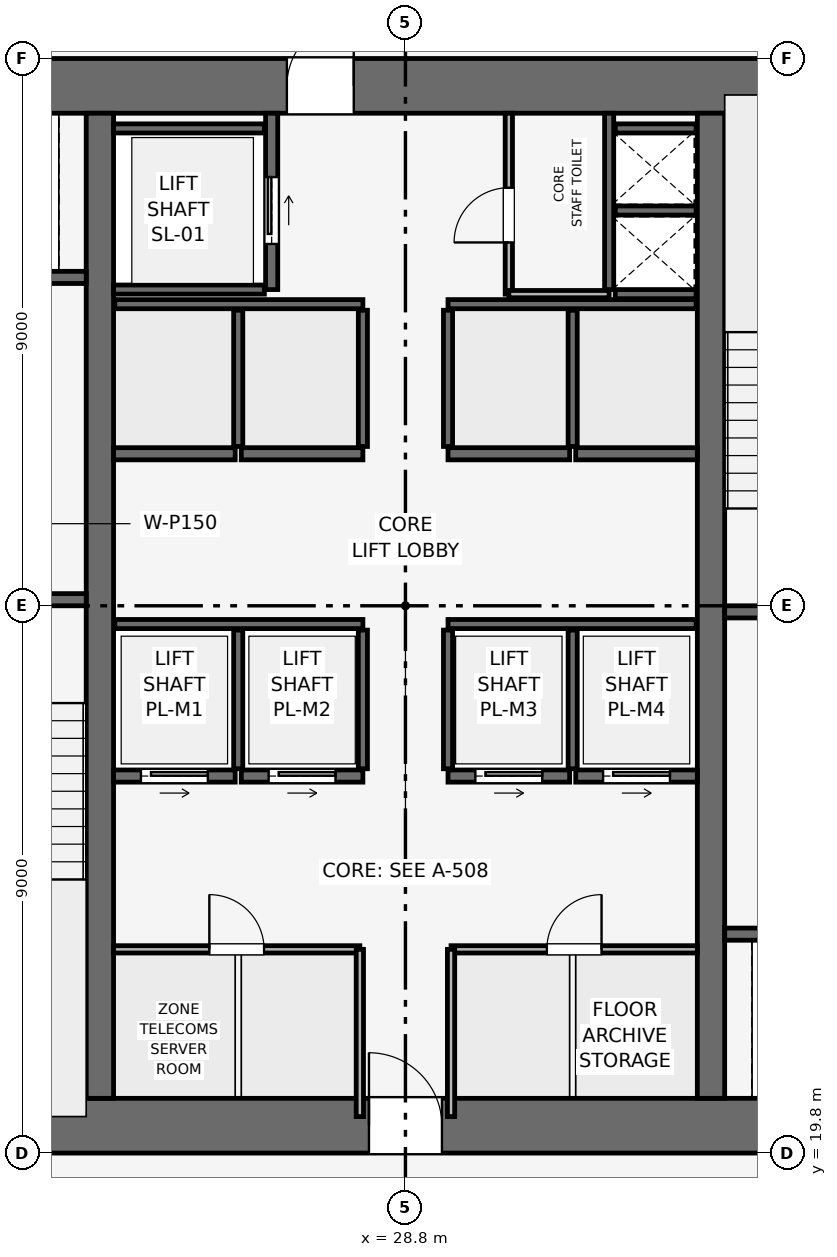
"""IFC4 building model, lengths in metres.
Left out: names, types, materials, properties, quantities, classifications, styles, units other than length and angle.
Written with IfcOpenShell. Run it as: python <this file> out.ifc"""

import sys

from ifc_helpers import new_model, si_unit, direction, frame, frame_2d, origin, place, context, subcontext, project, spatial, rectangle, extrude, element, fill, save


model = new_model("IFC4")
c1 = context("Model", 3, precision=1e-05, world=origin(), true_north=direction((0.0, 1.0)))
c2 = subcontext(c1, "Body", "Model", "MODEL_VIEW")
j1 = project(units=[si_unit("LENGTHUNIT", "METRE"), si_unit("PLANEANGLEUNIT", "RADIAN")], contexts=[c1])
p1 = place(None, origin())
s1 = spatial("IfcSite", under=j1, at=p1, CompositionType="ELEMENT")
p2 = place(p1, origin())
s2 = spatial("IfcBuilding", under=s1, at=p2, CompositionType="ELEMENT")
p3 = place(p2, frame((0.0, 0.0, 183.3)))
s3 = spatial("IfcBuildingStorey", under=s2, at=p3, CompositionType="ELEMENT", Elevation=183.3)
p4 = place(p3, frame((19.8, 20.25, 0.0), z_axis=(0.0, 0.0, 1.0), x_axis=(1.0, 0.0, 0.0)))
e1 = element("IfcWall", 1, at=p4, inside=s3, PredefinedType="SHEAR", context=c2, shape_type="SweptSolid", body=[
    extrude(rectangle(XDim=18.0, YDim=0.9, at=frame_2d((9.0, 0.0))), origin(), (0.0, 0.0, 1.0), 3.75),
])
p5 = place(p4, frame((8.4, 0.0, 0.0)))
e2 = element("IfcOpeningElement", 2, at=p5, cuts=e1, PredefinedType="OPENING", context=c2, shape_type="SweptSolid", body=[
    extrude(rectangle(XDim=1.2, YDim=2.2, at=frame_2d((0.6, 1.1))), frame((0.0, 0.46, 0.0), z_axis=(0.0, -1.0, 0.0), x_axis=(1.0, 0.0, 0.0)), (0.0, 0.0, 1.0), 0.92),
])
p6 = place(p3, frame((19.8, 37.35, 0.0), z_axis=(0.0, 0.0, 1.0), x_axis=(1.0, 0.0, 0.0)))
e3 = element("IfcWall", 3, at=p6, inside=s3, PredefinedType="SHEAR", context=c2, shape_type="SweptSolid", body=[
    extrude(rectangle(XDim=18.0, YDim=0.9, at=frame_2d((9.0, 0.0))), origin(), (0.0, 0.0, 1.0), 3.75),
])
p7 = place(p6, frame((7.05, 0.0, 0.0)))
e4 = element("IfcOpeningElement", 4, at=p7, cuts=e3, PredefinedType="OPENING", context=c2, shape_type="SweptSolid", body=[
    extrude(rectangle(XDim=1.1, YDim=2.15, at=frame_2d((0.55, 1.075))), frame((0.0, 0.46, 0.0), z_axis=(0.0, -1.0, 0.0), x_axis=(1.0, 0.0, 0.0)), (0.0, 0.0, 1.0), 0.92),
])
for number, where, z_axis, x_axis in (
    (5, (23.775, 20.7, 0.0), (0.0, 0.0, 1.0), (0.0, 1.0, 0.0)),
    (6, (33.825, 20.7, 0.0), (0.0, 0.0, 1.0), (0.0, 1.0, 0.0)),
):
    element("IfcWall", number, at=place(p3, frame(where, z_axis=z_axis, x_axis=x_axis)), inside=s3, PredefinedType="SHEAR", context=c2, shape_type="SweptSolid", body=[
        extrude(rectangle(XDim=16.2, YDim=0.45, at=frame_2d((8.1, 0.0))), origin(), (0.0, 0.0, 1.0), 3.75),
    ])
p8 = place(p3, frame((20.4, 28.9, 0.0), z_axis=(0.0, 0.0, 1.0), x_axis=(1.0, 0.0, 0.0)))
e7 = element("IfcWall", 7, at=p8, inside=s3, PredefinedType="SHEAR", context=c2, shape_type="SweptSolid", body=[
    extrude(rectangle(XDim=3.15, YDim=0.2, at=frame_2d((1.575, 0.0))), origin(), (0.0, 0.0, 1.0), 3.495),
])
p9 = place(p8, frame((0.8, 0.0, 0.0)))
e8 = element("IfcOpeningElement", 8, at=p9, cuts=e7, PredefinedType="OPENING", context=c2, shape_type="SweptSolid", body=[
    extrude(rectangle(XDim=1.0, YDim=2.1, at=frame_2d((0.5, 1.05))), frame((0.0, 0.11, 0.0), z_axis=(0.0, -1.0, 0.0), x_axis=(1.0, 0.0, 0.0)), (0.0, 0.0, 1.0), 0.22),
])
p10 = place(p3, frame((34.05, 28.7, 0.0), z_axis=(0.0, 0.0, 1.0), x_axis=(1.0, 0.0, 0.0)))
e9 = element("IfcWall", 9, at=p10, inside=s3, PredefinedType="SHEAR", context=c2, shape_type="SweptSolid", body=[
    extrude(rectangle(XDim=3.15, YDim=0.2, at=frame_2d((1.575, 0.0))), origin(), (0.0, 0.0, 1.0), 3.495),
])
p11 = place(p10, frame((0.8, 0.0, 0.0)))
e10 = element("IfcOpeningElement", 10, at=p11, cuts=e9, PredefinedType="OPENING", context=c2, shape_type="SweptSolid", body=[
    extrude(rectangle(XDim=1.0, YDim=2.1, at=frame_2d((0.5, 1.05))), frame((0.0, 0.11, 0.0), z_axis=(0.0, -1.0, 0.0), x_axis=(1.0, 0.0, 0.0)), (0.0, 0.0, 1.0), 0.22),
])
p12 = place(p3, frame((32.15, 34.0, 0.0), z_axis=(0.0, 0.0, 1.0), x_axis=(0.0, 1.0, 0.0)))
e11 = element("IfcWall", 11, at=p12, inside=s3, PredefinedType="SHEAR", context=c2, shape_type="SweptSolid", body=[
    extrude(rectangle(XDim=2.9, YDim=0.15, at=frame_2d((1.45, 0.0))), origin(), (0.0, 0.0, 1.0), 3.495),
])
for number, where, z_axis, x_axis in (
    (12, (32.25, 33.925, 0.0), (0.0, 0.0, 1.0), (1.0, 0.0, 0.0)),
    (13, (32.25, 35.3, 0.0), (0.0, 0.0, 1.0), (1.0, 0.0, 0.0)),
):
    element("IfcWall", number, at=place(p3, frame(where, z_axis=z_axis, x_axis=x_axis)), inside=s3, PredefinedType="SHEAR", context=c2, shape_type="SweptSolid", body=[
        extrude(rectangle(XDim=1.33, YDim=0.15, at=frame_2d((0.665, 0.0))), origin(), (0.0, 0.0, 1.0), 3.495),
    ])
p13 = place(p3, frame((20.5, 34.2, 0.0), z_axis=(0.0, 0.0, 1.0), x_axis=(1.0, 0.0, 0.0)))
e14 = element("IfcWall", 14, at=p13, inside=s3, PredefinedType="SHEAR", context=c2, shape_type="SweptSolid", body=[
    extrude(rectangle(XDim=3.05, YDim=0.2, at=frame_2d((1.525, 0.0))), origin(), (0.0, 0.0, 1.0), 3.495),
])
p14 = place(p13, frame((0.75, 0.0, 0.0)))
e15 = element("IfcOpeningElement", 15, at=p14, cuts=e14, PredefinedType="OPENING", context=c2, shape_type="SweptSolid", body=[
    extrude(rectangle(XDim=1.1, YDim=2.15, at=frame_2d((0.55, 1.075))), frame((0.0, 0.11, 0.0), z_axis=(0.0, -1.0, 0.0), x_axis=(1.0, 0.0, 0.0)), (0.0, 0.0, 1.0), 0.22),
])
p15 = place(p3, frame((34.05, 23.4, 0.0), z_axis=(0.0, 0.0, 1.0), x_axis=(1.0, 0.0, 0.0)))
e16 = element("IfcWall", 16, at=p15, inside=s3, PredefinedType="SHEAR", context=c2, shape_type="SweptSolid", body=[
    extrude(rectangle(XDim=3.05, YDim=0.2, at=frame_2d((1.525, 0.0))), origin(), (0.0, 0.0, 1.0), 3.495),
])
p16 = place(p15, frame((1.2, 0.0, 0.0)))
e17 = element("IfcOpeningElement", 17, at=p16, cuts=e16, PredefinedType="OPENING", context=c2, shape_type="SweptSolid", body=[
    extrude(rectangle(XDim=1.1, YDim=2.15, at=frame_2d((0.55, 1.075))), frame((0.0, 0.11, 0.0), z_axis=(0.0, -1.0, 0.0), x_axis=(1.0, 0.0, 0.0)), (0.0, 0.0, 1.0), 0.22),
])
p17 = place(p3, frame((26.6, 34.0, 0.0), z_axis=(0.0, 0.0, 1.0), x_axis=(0.0, 1.0, 0.0)))
e18 = element("IfcWall", 18, at=p17, inside=s3, PredefinedType="SHEAR", context=c2, shape_type="SweptSolid", body=[
    extrude(rectangle(XDim=2.9, YDim=0.2, at=frame_2d((1.45, 0.0))), origin(), (0.0, 0.0, 1.0), 3.495),
])
p18 = place(p17, frame((0.75, 0.0, 0.0)))
e19 = element("IfcOpeningElement", 19, at=p18, cuts=e18, PredefinedType="OPENING", context=c2, shape_type="SweptSolid", body=[
    extrude(rectangle(XDim=1.1, YDim=2.15, at=frame_2d((0.55, 1.075))), frame((0.0, 0.11, 0.0), z_axis=(0.0, -1.0, 0.0), x_axis=(1.0, 0.0, 0.0)), (0.0, 0.0, 1.0), 0.22),
])
for number, where, z_axis, x_axis in (
    (20, (24.0, 34.0, 0.0), (0.0, 0.0, 1.0), (1.0, 0.0, 0.0)),
    (21, (24.0, 36.65, 0.0), (0.0, 0.0, 1.0), (1.0, 0.0, 0.0)),
):
    element("IfcWall", number, at=place(p3, frame(where, z_axis=z_axis, x_axis=x_axis)), inside=s3, PredefinedType="SHEAR", context=c2, shape_type="SweptSolid", body=[
        extrude(rectangle(XDim=2.48, YDim=0.15, at=frame_2d((1.24, 0.0))), origin(), (0.0, 0.0, 1.0), 3.495),
    ])
p19 = place(p3, frame((24.0, 26.0, 0.0), z_axis=(0.0, 0.0, 1.0), x_axis=(1.0, 0.0, 0.0)))
e22 = element("IfcWall", 22, at=p19, inside=s3, PredefinedType="SHEAR", context=c2, shape_type="SweptSolid", body=[
    extrude(rectangle(XDim=2.0, YDim=0.2, at=frame_2d((1.0, 0.0))), origin(), (0.0, 0.0, 1.0), 3.495),
])
p20 = place(p19, frame((0.45, 0.0, 0.0)))
e23 = element("IfcOpeningElement", 23, at=p20, cuts=e22, PredefinedType="OPENING", context=c2, shape_type="SweptSolid", body=[
    extrude(rectangle(XDim=1.1, YDim=2.15, at=frame_2d((0.55, 1.075))), frame((0.0, 0.11, 0.0), z_axis=(0.0, -1.0, 0.0), x_axis=(1.0, 0.0, 0.0)), (0.0, 0.0, 1.0), 0.22),
])
p21 = place(p3, frame((26.1, 26.0, 0.0), z_axis=(0.0, 0.0, 1.0), x_axis=(1.0, 0.0, 0.0)))
e24 = element("IfcWall", 24, at=p21, inside=s3, PredefinedType="SHEAR", context=c2, shape_type="SweptSolid", body=[
    extrude(rectangle(XDim=2.0, YDim=0.2, at=frame_2d((1.0, 0.0))), origin(), (0.0, 0.0, 1.0), 3.495),
])
p22 = place(p21, frame((0.45, 0.0, 0.0)))
e25 = element("IfcOpeningElement", 25, at=p22, cuts=e24, PredefinedType="OPENING", context=c2, shape_type="SweptSolid", body=[
    extrude(rectangle(XDim=1.1, YDim=2.15, at=frame_2d((0.55, 1.075))), frame((0.0, 0.11, 0.0), z_axis=(0.0, -1.0, 0.0), x_axis=(1.0, 0.0, 0.0)), (0.0, 0.0, 1.0), 0.22),
])
p23 = place(p3, frame((29.5, 26.0, 0.0), z_axis=(0.0, 0.0, 1.0), x_axis=(1.0, 0.0, 0.0)))
e26 = element("IfcWall", 26, at=p23, inside=s3, PredefinedType="SHEAR", context=c2, shape_type="SweptSolid", body=[
    extrude(rectangle(XDim=2.0, YDim=0.2, at=frame_2d((1.0, 0.0))), origin(), (0.0, 0.0, 1.0), 3.495),
])
p24 = place(p23, frame((0.45, 0.0, 0.0)))
e27 = element("IfcOpeningElement", 27, at=p24, cuts=e26, PredefinedType="OPENING", context=c2, shape_type="SweptSolid", body=[
    extrude(rectangle(XDim=1.1, YDim=2.15, at=frame_2d((0.55, 1.075))), frame((0.0, 0.11, 0.0), z_axis=(0.0, -1.0, 0.0), x_axis=(1.0, 0.0, 0.0)), (0.0, 0.0, 1.0), 0.22),
])
p25 = place(p3, frame((31.6, 26.0, 0.0), z_axis=(0.0, 0.0, 1.0), x_axis=(1.0, 0.0, 0.0)))
e28 = element("IfcWall", 28, at=p25, inside=s3, PredefinedType="SHEAR", context=c2, shape_type="SweptSolid", body=[
    extrude(rectangle(XDim=2.0, YDim=0.2, at=frame_2d((1.0, 0.0))), origin(), (0.0, 0.0, 1.0), 3.495),
])
p26 = place(p25, frame((0.45, 0.0, 0.0)))
e29 = element("IfcOpeningElement", 29, at=p26, cuts=e28, PredefinedType="OPENING", context=c2, shape_type="SweptSolid", body=[
    extrude(rectangle(XDim=1.1, YDim=2.15, at=frame_2d((0.55, 1.075))), frame((0.0, 0.11, 0.0), z_axis=(0.0, -1.0, 0.0), x_axis=(1.0, 0.0, 0.0)), (0.0, 0.0, 1.0), 0.22),
])
for number, where, z_axis, x_axis in (
    (30, (24.0, 31.3, 0.0), (0.0, 0.0, 1.0), (1.0, 0.0, 0.0)),
    (31, (26.1, 31.3, 0.0), (0.0, 0.0, 1.0), (1.0, 0.0, 0.0)),
    (32, (29.5, 31.3, 0.0), (0.0, 0.0, 1.0), (1.0, 0.0, 0.0)),
    (33, (31.6, 31.3, 0.0), (0.0, 0.0, 1.0), (1.0, 0.0, 0.0)),
):
    element("IfcWall", number, at=place(p3, frame(where, z_axis=z_axis, x_axis=x_axis)), inside=s3, PredefinedType="SHEAR", context=c2, shape_type="SweptSolid", body=[
        extrude(rectangle(XDim=2.0, YDim=0.2, at=frame_2d((1.0, 0.0))), origin(), (0.0, 0.0, 1.0), 3.495),
    ])
p27 = place(p3, frame((32.25, 36.65, 0.0), z_axis=(0.0, 0.0, 1.0), x_axis=(1.0, 0.0, 0.0)))
e34 = element("IfcWall", 34, at=p27, inside=s3, PredefinedType="SHEAR", context=c2, shape_type="SweptSolid", body=[
    extrude(rectangle(XDim=1.33, YDim=0.15, at=frame_2d((0.665, 0.0))), origin(), (0.0, 0.0, 1.0), 3.495),
])
for number, where, z_axis, x_axis in (
    (35, (24.02, 28.5, 0.0), (0.0, 0.0, 1.0), (1.0, 0.0, 0.0)),
    (36, (29.5, 28.5, 0.0), (0.0, 0.0, 1.0), (1.0, 0.0, 0.0)),
):
    element("IfcWall", number, at=place(p3, frame(where, z_axis=z_axis, x_axis=x_axis)), inside=s3, PredefinedType="SHEAR", context=c2, shape_type="SweptSolid", body=[
        extrude(rectangle(XDim=4.08, YDim=0.15, at=frame_2d((2.04, 0.0))), origin(), (0.0, 0.0, 1.0), 3.495),
    ])
for number, where, z_axis, x_axis in (
    (37, (26.05, 26.12, 0.0), (0.0, 0.0, 1.0), (0.0, 1.0, 0.0)),
    (38, (28.1, 26.12, 0.0), (0.0, 0.0, 1.0), (0.0, 1.0, 0.0)),
    (39, (29.5, 26.12, 0.0), (0.0, 0.0, 1.0), (0.0, 1.0, 0.0)),
    (40, (31.55, 26.12, 0.0), (0.0, 0.0, 1.0), (0.0, 1.0, 0.0)),
):
    element("IfcWall", number, at=place(p3, frame(where, z_axis=z_axis, x_axis=x_axis)), inside=s3, PredefinedType="SHEAR", context=c2, shape_type="SweptSolid", body=[
        extrude(rectangle(XDim=2.28, YDim=0.15, at=frame_2d((1.14, 0.0))), origin(), (0.0, 0.0, 1.0), 3.495),
    ])
for number, where, z_axis, x_axis in (
    (41, (24.02, 33.76, 0.0), (0.0, 0.0, 1.0), (1.0, 0.0, 0.0)),
    (42, (29.5, 33.76, 0.0), (0.0, 0.0, 1.0), (1.0, 0.0, 0.0)),
):
    element("IfcWall", number, at=place(p3, frame(where, z_axis=z_axis, x_axis=x_axis)), inside=s3, PredefinedType="SHEAR", context=c2, shape_type="SweptSolid", body=[
        extrude(rectangle(XDim=4.08, YDim=0.15, at=frame_2d((2.04, 0.0))), origin(), (0.0, 0.0, 1.0), 3.495),
    ])
for number, where, z_axis, x_axis in (
    (43, (26.05, 31.42, 0.0), (0.0, 0.0, 1.0), (0.0, 1.0, 0.0)),
    (44, (28.1, 31.42, 0.0), (0.0, 0.0, 1.0), (0.0, 1.0, 0.0)),
    (45, (29.5, 31.42, 0.0), (0.0, 0.0, 1.0), (0.0, 1.0, 0.0)),
    (46, (31.55, 31.42, 0.0), (0.0, 0.0, 1.0), (0.0, 1.0, 0.0)),
):
    element("IfcWall", number, at=place(p3, frame(where, z_axis=z_axis, x_axis=x_axis)), inside=s3, PredefinedType="SHEAR", context=c2, shape_type="SweptSolid", body=[
        extrude(rectangle(XDim=2.24, YDim=0.15, at=frame_2d((1.12, 0.0))), origin(), (0.0, 0.0, 1.0), 3.495),
    ])
p28 = place(p3, frame((30.5, 33.925, 0.0), z_axis=(0.0, 0.0, 1.0), x_axis=(0.0, 1.0, 0.0)))
e47 = element("IfcWall", 47, at=p28, inside=s3, PredefinedType="PARTITIONING", context=c2, shape_type="SweptSolid", body=[
    extrude(rectangle(XDim=2.975, YDim=0.12, at=frame_2d((1.487, 0.0))), origin(), (0.0, 0.0, 1.0), 3.495),
])
p29 = place(p28, frame((0.85, 0.0, 0.0)))
e48 = element("IfcOpeningElement", 48, at=p29, cuts=e47, PredefinedType="OPENING", context=c2, shape_type="SweptSolid", body=[
    extrude(rectangle(XDim=0.9, YDim=2.1, at=frame_2d((0.45, 1.05))), frame((0.0, 0.07, 0.0), z_axis=(0.0, -1.0, 0.0), x_axis=(1.0, 0.0, 0.0)), (0.0, 0.0, 1.0), 0.14),
])
p30 = place(p3, frame((30.5, 33.925, 0.0), z_axis=(0.0, 0.0, 1.0), x_axis=(1.0, 0.0, 0.0)))
e49 = element("IfcWall", 49, at=p30, inside=s3, PredefinedType="PARTITIONING", context=c2, shape_type="SweptSolid", body=[
    extrude(rectangle(XDim=1.65, YDim=0.12, at=frame_2d((0.825, 0.0))), origin(), (0.0, 0.0, 1.0), 3.495),
])
p31 = place(p3, frame((24.0, 23.15, 0.0), z_axis=(0.0, 0.0, 1.0), x_axis=(1.0, 0.0, 0.0)))
e50 = element("IfcWall", 50, at=p31, inside=s3, PredefinedType="PARTITIONING", context=c2, shape_type="SweptSolid", body=[
    extrude(rectangle(XDim=4.05, YDim=0.12, at=frame_2d((2.025, 0.0))), origin(), (0.0, 0.0, 1.0), 3.495),
])
p32 = place(p31, frame((1.575, 0.0, 0.0)))
e51 = element("IfcOpeningElement", 51, at=p32, cuts=e50, PredefinedType="OPENING", context=c2, shape_type="SweptSolid", body=[
    extrude(rectangle(XDim=0.9, YDim=2.1, at=frame_2d((0.45, 1.05))), frame((0.0, 0.07, 0.0), z_axis=(0.0, -1.0, 0.0), x_axis=(1.0, 0.0, 0.0)), (0.0, 0.0, 1.0), 0.14),
])
p33 = place(p3, frame((28.05, 20.4, 0.0), z_axis=(0.0, 0.0, 1.0), x_axis=(0.0, 1.0, 0.0)))
e52 = element("IfcWall", 52, at=p33, inside=s3, PredefinedType="PARTITIONING", context=c2, shape_type="SweptSolid", body=[
    extrude(rectangle(XDim=2.75, YDim=0.12, at=frame_2d((1.375, 0.0))), origin(), (0.0, 0.0, 1.0), 3.495),
])
p34 = place(p3, frame((29.55, 23.15, 0.0), z_axis=(0.0, 0.0, 1.0), x_axis=(1.0, 0.0, 0.0)))
e53 = element("IfcWall", 53, at=p34, inside=s3, PredefinedType="PARTITIONING", context=c2, shape_type="SweptSolid", body=[
    extrude(rectangle(XDim=4.05, YDim=0.12, at=frame_2d((2.025, 0.0))), origin(), (0.0, 0.0, 1.0), 3.495),
])
p35 = place(p34, frame((1.575, 0.0, 0.0)))
e54 = element("IfcOpeningElement", 54, at=p35, cuts=e53, PredefinedType="OPENING", context=c2, shape_type="SweptSolid", body=[
    extrude(rectangle(XDim=0.9, YDim=2.1, at=frame_2d((0.45, 1.05))), frame((0.0, 0.07, 0.0), z_axis=(0.0, -1.0, 0.0), x_axis=(1.0, 0.0, 0.0)), (0.0, 0.0, 1.0), 0.14),
])
p36 = place(p3, frame((29.55, 20.4, 0.0), z_axis=(0.0, 0.0, 1.0), x_axis=(0.0, 1.0, 0.0)))
e55 = element("IfcWall", 55, at=p36, inside=s3, PredefinedType="PARTITIONING", context=c2, shape_type="SweptSolid", body=[
    extrude(rectangle(XDim=2.75, YDim=0.12, at=frame_2d((1.375, 0.0))), origin(), (0.0, 0.0, 1.0), 3.495),
])
p37 = place(p18, origin())
e56 = element("IfcDoor", 56, at=p37, inside=s3, OperationType="SLIDING_TO_RIGHT", PredefinedType="DOOR", context=c2, shape_type="SweptSolid", body=[
    extrude(rectangle(XDim=1.1, YDim=2.15, at=frame_2d((0.55, 1.075))), frame((0.0, 0.025, 0.0), z_axis=(0.0, -1.0, 0.0), x_axis=(1.0, 0.0, 0.0)), (0.0, 0.0, 1.0), 0.05),
])
fill(e19, e56)
p38 = place(p20, origin())
e57 = element("IfcDoor", 57, at=p38, inside=s3, OperationType="SLIDING_TO_RIGHT", PredefinedType="DOOR", context=c2, shape_type="SweptSolid", body=[
    extrude(rectangle(XDim=1.1, YDim=2.15, at=frame_2d((0.55, 1.075))), frame((0.0, 0.025, 0.0), z_axis=(0.0, -1.0, 0.0), x_axis=(1.0, 0.0, 0.0)), (0.0, 0.0, 1.0), 0.05),
])
fill(e23, e57)
p39 = place(p22, origin())
e58 = element("IfcDoor", 58, at=p39, inside=s3, OperationType="SLIDING_TO_RIGHT", PredefinedType="DOOR", context=c2, shape_type="SweptSolid", body=[
    extrude(rectangle(XDim=1.1, YDim=2.15, at=frame_2d((0.55, 1.075))), frame((0.0, 0.025, 0.0), z_axis=(0.0, -1.0, 0.0), x_axis=(1.0, 0.0, 0.0)), (0.0, 0.0, 1.0), 0.05),
])
fill(e25, e58)
p40 = place(p24, origin())
e59 = element("IfcDoor", 59, at=p40, inside=s3, OperationType="SLIDING_TO_RIGHT", PredefinedType="DOOR", context=c2, shape_type="SweptSolid", body=[
    extrude(rectangle(XDim=1.1, YDim=2.15, at=frame_2d((0.55, 1.075))), frame((0.0, 0.025, 0.0), z_axis=(0.0, -1.0, 0.0), x_axis=(1.0, 0.0, 0.0)), (0.0, 0.0, 1.0), 0.05),
])
fill(e27, e59)
p41 = place(p26, origin())
e60 = element("IfcDoor", 60, at=p41, inside=s3, OperationType="SLIDING_TO_RIGHT", PredefinedType="DOOR", context=c2, shape_type="SweptSolid", body=[
    extrude(rectangle(XDim=1.1, YDim=2.15, at=frame_2d((0.55, 1.075))), frame((0.0, 0.025, 0.0), z_axis=(0.0, -1.0, 0.0), x_axis=(1.0, 0.0, 0.0)), (0.0, 0.0, 1.0), 0.05),
])
fill(e29, e60)
p42 = place(p29, origin())
e61 = element("IfcDoor", 61, at=p42, inside=s3, OperationType="SINGLE_SWING_LEFT", PredefinedType="DOOR", context=c2, shape_type="SweptSolid", body=[
    extrude(rectangle(XDim=0.9, YDim=2.1, at=frame_2d((0.45, 1.05))), frame((0.0, 0.025, 0.0), z_axis=(0.0, -1.0, 0.0), x_axis=(1.0, 0.0, 0.0)), (0.0, 0.0, 1.0), 0.05),
])
fill(e48, e61)
p43 = place(p32, origin())
e62 = element("IfcDoor", 62, at=p43, inside=s3, OperationType="SINGLE_SWING_LEFT", PredefinedType="DOOR", context=c2, shape_type="SweptSolid", body=[
    extrude(rectangle(XDim=0.9, YDim=2.1, at=frame_2d((0.45, 1.05))), frame((0.0, 0.025, 0.0), z_axis=(0.0, -1.0, 0.0), x_axis=(1.0, 0.0, 0.0)), (0.0, 0.0, 1.0), 0.05),
])
fill(e51, e62)
p44 = place(p35, origin())
e63 = element("IfcDoor", 63, at=p44, inside=s3, OperationType="SINGLE_SWING_RIGHT", PredefinedType="DOOR", context=c2, shape_type="SweptSolid", body=[
    extrude(rectangle(XDim=0.9, YDim=2.1, at=frame_2d((0.45, 1.05))), frame((0.0, 0.025, 0.0), z_axis=(0.0, -1.0, 0.0), x_axis=(1.0, 0.0, 0.0)), (0.0, 0.0, 1.0), 0.05),
])
fill(e54, e63)
p45 = place(p5, origin())
e64 = element("IfcDoor", 64, at=p45, inside=s3, OperationType="SINGLE_SWING_LEFT", PredefinedType="DOOR", context=c2, shape_type="SweptSolid", body=[
    extrude(rectangle(XDim=1.2, YDim=2.2, at=frame_2d((0.6, 1.1))), frame((0.0, 0.025, 0.0), z_axis=(0.0, -1.0, 0.0), x_axis=(1.0, 0.0, 0.0)), (0.0, 0.0, 1.0), 0.05),
])
fill(e2, e64)
p46 = place(p7, origin())
e65 = element("IfcDoor", 65, at=p46, inside=s3, OperationType="SINGLE_SWING_RIGHT", PredefinedType="DOOR", context=c2, shape_type="SweptSolid", body=[
    extrude(rectangle(XDim=1.1, YDim=2.15, at=frame_2d((0.55, 1.075))), frame((0.0, 0.025, 0.0), z_axis=(0.0, -1.0, 0.0), x_axis=(1.0, 0.0, 0.0)), (0.0, 0.0, 1.0), 0.05),
])
fill(e4, e65)
save(model, sys.argv[1])
